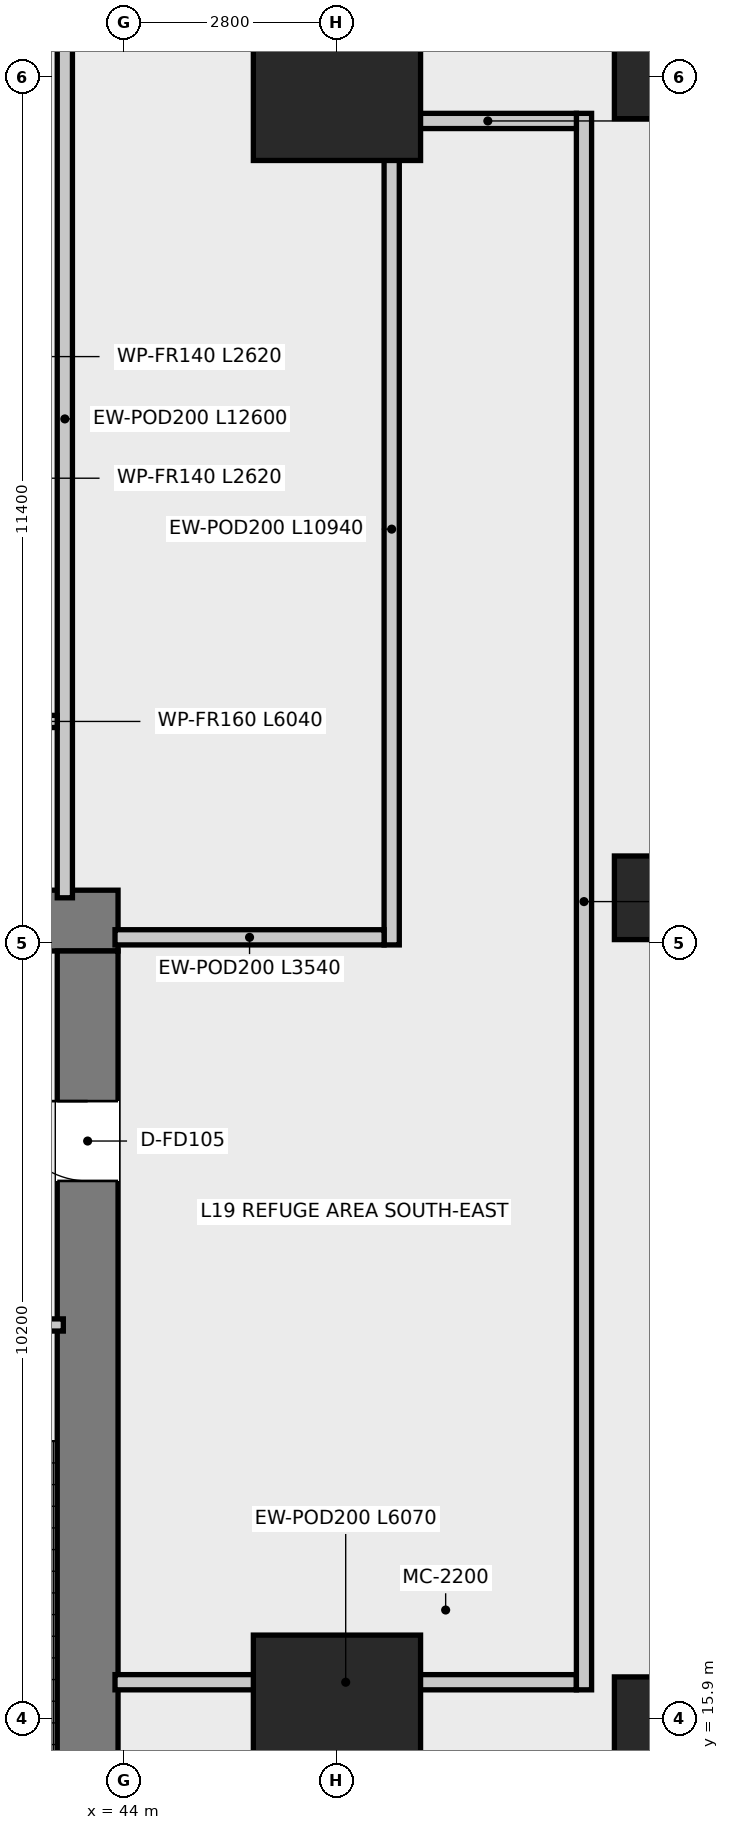
"""IFC4 building model, lengths in metres.
Left out: names, types, materials, properties, quantities, classifications, styles, units other than length and angle.
Written with IfcOpenShell. Run it as: python <this file> out.ifc"""

import sys

from ifc_helpers import new_model, si_unit, direction, frame, frame_2d, origin, origin_2d, place, context, subcontext, project, spatial, rectangle, extrude, source, transform, mapped, element, fill, save


model = new_model("IFC4")
c1 = context("Model", 3, precision=1e-05, world=origin(), true_north=direction((0.0, 1.0)))
c2 = subcontext(c1, "Body", "Model", "MODEL_VIEW")
j1 = project(units=[si_unit("LENGTHUNIT", "METRE"), si_unit("PLANEANGLEUNIT", "RADIAN")], contexts=[c1])
p1 = place(None, origin())
s1 = spatial("IfcSite", under=j1, at=p1, CompositionType="ELEMENT")
p2 = place(p1, origin())
s2 = spatial("IfcBuilding", under=s1, at=p2, CompositionType="ELEMENT")
p3 = place(p2, frame((0.0, 0.0, 80.3)))
s3 = spatial("IfcBuildingStorey", under=s2, at=p3, CompositionType="ELEMENT", Elevation=80.3)
p4 = place(p3, frame((28.08, 26.4, 0.0), z_axis=(0.0, 0.0, 1.0), x_axis=(1.0, 0.0, 0.0)))
e1 = element("IfcWall", 1, at=p4, inside=s3, PredefinedType="SHEAR", context=c2, shape_type="SweptSolid", body=[
    extrude(rectangle(XDim=15.84, YDim=0.8, at=frame_2d((7.92, 0.0))), origin(), (0.0, 0.0, 1.0), 5.8),
])
p5 = place(p4, frame((7.22, 0.0, 0.0)))
e2 = element("IfcOpeningElement", 2, at=p5, cuts=e1, PredefinedType="OPENING", context=c2, shape_type="SweptSolid", body=[
    extrude(rectangle(XDim=1.4, YDim=2.2, at=frame_2d((0.7, 1.1))), frame((0.0, 0.41, 0.0), z_axis=(0.0, -1.0, 0.0), x_axis=(1.0, 0.0, 0.0)), (0.0, 0.0, 1.0), 0.82),
])
p6 = place(p4, frame((1.775, 0.0, 0.0)))
e3 = element("IfcOpeningElement", 3, at=p6, cuts=e1, PredefinedType="OPENING", context=c2, shape_type="SweptSolid", body=[
    extrude(rectangle(XDim=1.05, YDim=2.1, at=frame_2d((0.525, 1.05))), frame((0.0, 0.41, 0.0), z_axis=(0.0, -1.0, 0.0), x_axis=(1.0, 0.0, 0.0)), (0.0, 0.0, 1.0), 0.82),
])
p7 = place(p4, frame((13.015, 0.0, 0.0)))
e4 = element("IfcOpeningElement", 4, at=p7, cuts=e1, PredefinedType="OPENING", context=c2, shape_type="SweptSolid", body=[
    extrude(rectangle(XDim=1.05, YDim=2.1, at=frame_2d((0.525, 1.05))), frame((0.0, 0.41, 0.0), z_axis=(0.0, -1.0, 0.0), x_axis=(1.0, 0.0, 0.0)), (0.0, 0.0, 1.0), 0.82),
])
p8 = place(p3, frame((43.52, 11.3, 0.0), z_axis=(0.0, 0.0, 1.0), x_axis=(0.0, 1.0, 0.0)))
e5 = element("IfcWall", 5, at=p8, inside=s3, PredefinedType="SHEAR", context=c2, shape_type="SweptSolid", body=[
    extrude(rectangle(XDim=14.7, YDim=0.8, at=frame_2d((7.35, 0.0))), origin(), (0.0, 0.0, 1.0), 5.8),
])
p9 = place(p8, frame((11.675, 0.0, 0.0)))
e6 = element("IfcOpeningElement", 6, at=p9, cuts=e5, PredefinedType="OPENING", context=c2, shape_type="SweptSolid", body=[
    extrude(rectangle(XDim=1.05, YDim=2.1, at=frame_2d((0.525, 1.05))), frame((0.0, 0.41, 0.0), z_axis=(0.0, -1.0, 0.0), x_axis=(1.0, 0.0, 0.0)), (0.0, 0.0, 1.0), 0.82),
])
m1 = source(origin(), c2, "Body", "SweptSolid", [
    extrude(rectangle(XDim=2.2, YDim=2.2, at=origin_2d()), origin(), (0.0, 0.0, 1.0), 5.8),
])
for number, where, z_axis, x_axis in (
    (7, (46.8, 15.9, 0.0), (0.0, 0.0, 1.0), (1.0, 0.0, 0.0)),
    (8, (46.8, 37.5, 0.0), (0.0, 0.0, 1.0), (1.0, 0.0, 0.0)),
):
    element("IfcColumn", number, at=place(p3, frame(where, z_axis=z_axis, x_axis=x_axis)), inside=s3, PredefinedType="USERDEFINED", context=c2, shape_type="MappedRepresentation", body=[
        mapped(m1, transform((0.0, 0.0, 0.0), x_axis=(1.0, 0.0, 0.0), y_axis=(0.0, 1.0, 0.0), z_axis=(0.0, 0.0, 1.0), scale=1.0)),
    ])
m2 = source(origin(), c2, "Body", "SweptSolid", [
    extrude(rectangle(XDim=1.1, YDim=1.1, at=origin_2d()), origin(), (0.0, 0.0, 1.0), 5.8),
])
for number, where, z_axis, x_axis in (
    (9, (51.0, 37.5, 0.0), (0.0, 0.0, 1.0), (1.0, 0.0, 0.0)),
    (10, (51.0, 26.7, 0.0), (0.0, 0.0, 1.0), (1.0, 0.0, 0.0)),
    (11, (51.0, 15.9, 0.0), (0.0, 0.0, 1.0), (1.0, 0.0, 0.0)),
):
    element("IfcColumn", number, at=place(p3, frame(where, z_axis=z_axis, x_axis=x_axis)), inside=s3, PredefinedType="COLUMN", context=c2, shape_type="MappedRepresentation", body=[
        mapped(m2, transform((0.0, 0.0, 0.0), x_axis=(1.0, 0.0, 0.0), y_axis=(0.0, 1.0, 0.0), z_axis=(0.0, 0.0, 1.0), scale=1.0)),
    ])
p10 = place(p3, frame((40.04, 21.08, 0.0), z_axis=(0.0, 0.0, 1.0), x_axis=(1.0, 0.0, 0.0)))
e12 = element("IfcWall", 12, at=p10, inside=s3, PredefinedType="PARTITIONING", context=c2, shape_type="SweptSolid", body=[
    extrude(rectangle(XDim=3.16, YDim=0.16, at=frame_2d((1.58, 0.0))), origin(), (0.0, 0.0, 1.0), 5.52),
])
p11 = place(p10, frame((1.055, 0.0, 0.0)))
e13 = element("IfcOpeningElement", 13, at=p11, cuts=e12, PredefinedType="OPENING", context=c2, shape_type="SweptSolid", body=[
    extrude(rectangle(XDim=1.05, YDim=2.1, at=frame_2d((0.525, 1.05))), frame((0.0, 0.09, 0.0), z_axis=(0.0, -1.0, 0.0), x_axis=(1.0, 0.0, 0.0)), (0.0, 0.0, 1.0), 0.18),
])
p12 = place(p3, frame((43.22, 26.7, 0.0), z_axis=(0.0, 0.0, 1.0), x_axis=(0.0, 1.0, 0.0)))
e14 = element("IfcWall", 14, at=p12, inside=s3, PredefinedType="SOLIDWALL", context=c2, shape_type="SweptSolid", body=[
    extrude(rectangle(XDim=12.6, YDim=0.2, at=frame_2d((6.3, 0.0))), origin(), (0.0, 0.0, 1.0), 4.82),
])
p13 = place(p3, frame((43.88, 16.38, 0.0), z_axis=(0.0, 0.0, 1.0), x_axis=(1.0, 0.0, 0.0)))
e15 = element("IfcWall", 15, at=p13, inside=s3, PredefinedType="SOLIDWALL", context=c2, shape_type="SweptSolid", body=[
    extrude(rectangle(XDim=6.07, YDim=0.2, at=frame_2d((3.035, 0.0))), origin(), (0.0, 0.0, 1.0), 4.82),
])
p14 = place(p3, frame((50.05, 16.28, 0.0), z_axis=(0.0, 0.0, 1.0), x_axis=(0.0, 1.0, 0.0)))
e16 = element("IfcWall", 16, at=p14, inside=s3, PredefinedType="SOLIDWALL", context=c2, shape_type="SweptSolid", body=[
    extrude(rectangle(XDim=20.74, YDim=0.2, at=frame_2d((10.37, 0.0))), origin(), (0.0, 0.0, 1.0), 4.93),
])
p15 = place(p3, frame((47.62, 36.92, 0.0), z_axis=(0.0, 0.0, 1.0), x_axis=(1.0, 0.0, 0.0)))
e17 = element("IfcWall", 17, at=p15, inside=s3, PredefinedType="SOLIDWALL", context=c2, shape_type="SweptSolid", body=[
    extrude(rectangle(XDim=2.33, YDim=0.2, at=frame_2d((1.165, 0.0))), origin(), (0.0, 0.0, 1.0), 5.52),
])
p16 = place(p3, frame((47.52, 26.08, 0.0), z_axis=(0.0, 0.0, 1.0), x_axis=(0.0, 1.0, 0.0)))
e18 = element("IfcWall", 18, at=p16, inside=s3, PredefinedType="SOLIDWALL", context=c2, shape_type="SweptSolid", body=[
    extrude(rectangle(XDim=10.94, YDim=0.2, at=frame_2d((5.47, 0.0))), origin(), (0.0, 0.0, 1.0), 4.93),
])
p17 = place(p3, frame((43.88, 26.18, 0.0), z_axis=(0.0, 0.0, 1.0), x_axis=(1.0, 0.0, 0.0)))
e19 = element("IfcWall", 19, at=p17, inside=s3, PredefinedType="SOLIDWALL", context=c2, shape_type="SweptSolid", body=[
    extrude(rectangle(XDim=3.54, YDim=0.2, at=frame_2d((1.77, 0.0))), origin(), (0.0, 0.0, 1.0), 4.82),
])
p18 = place(p3, frame((37.08, 29.02, 0.0), z_axis=(0.0, 0.0, 1.0), x_axis=(1.0, 0.0, 0.0)))
e20 = element("IfcWall", 20, at=p18, inside=s3, PredefinedType="PARTITIONING", context=c2, shape_type="SweptSolid", body=[
    extrude(rectangle(XDim=6.04, YDim=0.16, at=frame_2d((3.02, 0.0))), origin(), (0.0, 0.0, 1.0), 4.93),
])
p19 = place(p18, frame((3.845, 0.0, 0.0)))
e21 = element("IfcOpeningElement", 21, at=p19, cuts=e20, PredefinedType="OPENING", context=c2, shape_type="SweptSolid", body=[
    extrude(rectangle(XDim=1.05, YDim=2.1, at=frame_2d((0.525, 1.05))), frame((0.0, 0.09, 0.0), z_axis=(0.0, -1.0, 0.0), x_axis=(1.0, 0.0, 0.0)), (0.0, 0.0, 1.0), 0.18),
])
p20 = place(p9, origin())
e22 = element("IfcDoor", 22, at=p20, inside=s3, OperationType="SINGLE_SWING_RIGHT", PredefinedType="DOOR", context=c2, shape_type="SweptSolid", body=[
    extrude(rectangle(XDim=1.05, YDim=2.1, at=frame_2d((0.525, 1.05))), frame((0.0, 0.025, 0.0), z_axis=(0.0, -1.0, 0.0), x_axis=(1.0, 0.0, 0.0)), (0.0, 0.0, 1.0), 0.05),
])
fill(e6, e22)
save(model, sys.argv[1])
